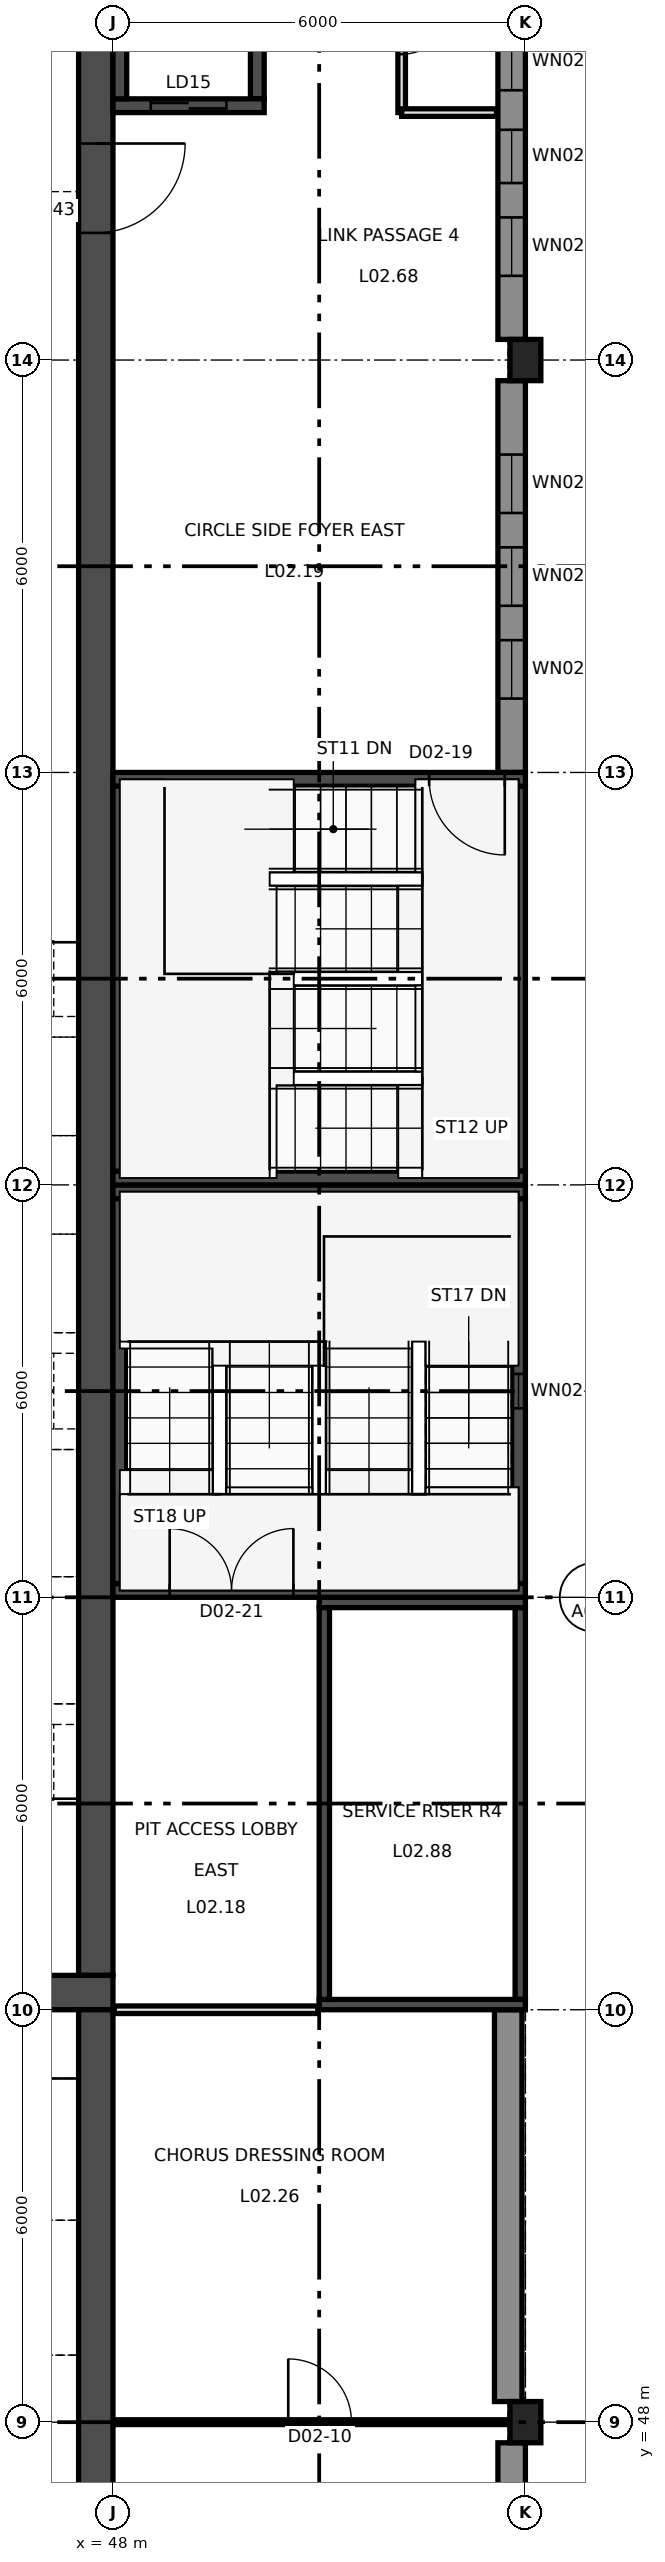
"""IFC4 building model, lengths in metres.
Left out: names, types, materials, properties, quantities, classifications, styles, units other than length and angle.
Written with IfcOpenShell. Run it as: python <this file> out.ifc"""

import sys

from ifc_helpers import new_model, si_unit, direction, frame, frame_2d, origin, origin_2d, place, context, subcontext, project, spatial, rectangle, extrude, element, fill, save


model = new_model("IFC4")
c1 = context("Model", 3, precision=1e-05, world=origin(), true_north=direction((0.0, 1.0)))
c2 = subcontext(c1, "Body", "Model", "MODEL_VIEW")
j1 = project(units=[si_unit("LENGTHUNIT", "METRE"), si_unit("PLANEANGLEUNIT", "RADIAN")], contexts=[c1])
p1 = place(None, origin())
s1 = spatial("IfcSite", under=j1, at=p1, CompositionType="ELEMENT")
p2 = place(p1, origin())
s2 = spatial("IfcBuilding", under=s1, at=p2, CompositionType="ELEMENT")
p3 = place(p2, frame((0.0, 0.0, 12.0)))
s3 = spatial("IfcBuildingStorey", under=s2, at=p3, CompositionType="ELEMENT", Elevation=12.0)
for number, where, z_axis, x_axis in (
    (1, (54.0, 48.0, 0.0), (0.0, 0.0, 1.0), (1.0, 0.0, 0.0)),
    (2, (54.0, 78.0, 0.0), (0.0, 0.0, 1.0), (1.0, 0.0, 0.0)),
):
    element("IfcColumn", number, at=place(p3, frame(where, z_axis=z_axis, x_axis=x_axis)), inside=s3, PredefinedType="COLUMN", context=c2, shape_type="SweptSolid", body=[
        extrude(rectangle(XDim=0.45, YDim=0.6, at=origin_2d()), origin(), (0.0, 0.0, 1.0), 4.5),
    ])
p4 = place(p3, frame((48.0, 71.9, 0.0), z_axis=(0.0, 0.0, 1.0), x_axis=(1.0, 0.0, 0.0)))
e3 = element("IfcWall", 3, at=p4, inside=s3, PredefinedType="SHEAR", context=c2, shape_type="SweptSolid", body=[
    extrude(rectangle(XDim=6.0, YDim=0.2, at=frame_2d((3.0, 0.0))), origin(), (0.0, 0.0, 1.0), 4.5),
])
p5 = place(p4, frame((4.6, 0.0, 0.0)))
e4 = element("IfcOpeningElement", 4, at=p5, cuts=e3, PredefinedType="OPENING", context=c2, shape_type="SweptSolid", body=[
    extrude(rectangle(XDim=1.1, YDim=2.2, at=frame_2d((0.55, 1.1))), frame((0.0, 0.11, 0.0), z_axis=(0.0, -1.0, 0.0), x_axis=(1.0, 0.0, 0.0)), (0.0, 0.0, 1.0), 0.22),
])
p6 = place(p3, frame((48.0, 66.1, 0.0), z_axis=(0.0, 0.0, 1.0), x_axis=(1.0, 0.0, 0.0)))
e5 = element("IfcWall", 5, at=p6, inside=s3, PredefinedType="SHEAR", context=c2, shape_type="SweptSolid", body=[
    extrude(rectangle(XDim=6.0, YDim=0.2, at=frame_2d((3.0, 0.0))), origin(), (0.0, 0.0, 1.0), 4.5),
])
for number, where, z_axis, x_axis in (
    (6, (48.1, 66.2, 0.0), (0.0, 0.0, 1.0), (0.0, 1.0, 0.0)),
    (7, (53.9, 66.2, 0.0), (0.0, 0.0, 1.0), (0.0, 1.0, 0.0)),
):
    element("IfcWall", number, at=place(p3, frame(where, z_axis=z_axis, x_axis=x_axis)), inside=s3, PredefinedType="SHEAR", context=c2, shape_type="SweptSolid", body=[
        extrude(rectangle(XDim=5.6, YDim=0.2, at=frame_2d((2.8, 0.0))), origin(), (0.0, 0.0, 1.0), 4.5),
    ])
p7 = place(p3, frame((48.0, 65.9, 0.0), z_axis=(0.0, 0.0, 1.0), x_axis=(1.0, 0.0, 0.0)))
e8 = element("IfcWall", 8, at=p7, inside=s3, PredefinedType="SHEAR", context=c2, shape_type="SweptSolid", body=[
    extrude(rectangle(XDim=6.0, YDim=0.2, at=frame_2d((3.0, 0.0))), origin(), (0.0, 0.0, 1.0), 4.5),
])
p8 = place(p3, frame((48.0, 60.1, 0.0), z_axis=(0.0, 0.0, 1.0), x_axis=(1.0, 0.0, 0.0)))
e9 = element("IfcWall", 9, at=p8, inside=s3, PredefinedType="SHEAR", context=c2, shape_type="SweptSolid", body=[
    extrude(rectangle(XDim=6.0, YDim=0.2, at=frame_2d((3.0, 0.0))), origin(), (0.0, 0.0, 1.0), 4.5),
])
p9 = place(p8, frame((0.825, 0.0, 0.0)))
e10 = element("IfcOpeningElement", 10, at=p9, cuts=e9, PredefinedType="OPENING", context=c2, shape_type="SweptSolid", body=[
    extrude(rectangle(XDim=1.8, YDim=2.2, at=frame_2d((0.9, 1.1))), frame((0.0, 0.11, 0.0), z_axis=(0.0, -1.0, 0.0), x_axis=(1.0, 0.0, 0.0)), (0.0, 0.0, 1.0), 0.22),
])
p10 = place(p3, frame((48.1, 60.2, 0.0), z_axis=(0.0, 0.0, 1.0), x_axis=(0.0, 1.0, 0.0)))
e11 = element("IfcWall", 11, at=p10, inside=s3, PredefinedType="SHEAR", context=c2, shape_type="SweptSolid", body=[
    extrude(rectangle(XDim=5.6, YDim=0.2, at=frame_2d((2.8, 0.0))), origin(), (0.0, 0.0, 1.0), 4.5),
])
p11 = place(p3, frame((53.9, 60.2, 0.0), z_axis=(0.0, 0.0, 1.0), x_axis=(0.0, 1.0, 0.0)))
e12 = element("IfcWall", 12, at=p11, inside=s3, PredefinedType="SHEAR", context=c2, shape_type="SweptSolid", body=[
    extrude(rectangle(XDim=5.6, YDim=0.2, at=frame_2d((2.8, 0.0))), origin(), (0.0, 0.0, 1.0), 4.5),
])
p12 = place(p11, frame((2.55, 0.0, 0.9)))
e13 = element("IfcOpeningElement", 13, at=p12, cuts=e12, PredefinedType="OPENING", context=c2, shape_type="SweptSolid", body=[
    extrude(rectangle(XDim=0.5, YDim=2.1, at=frame_2d((0.25, 1.05))), frame((0.0, 0.11, 0.0), z_axis=(0.0, -1.0, 0.0), x_axis=(1.0, 0.0, 0.0)), (0.0, 0.0, 1.0), 0.22),
])
p13 = place(p3, frame((48.0, 81.7, 0.0), z_axis=(0.0, 0.0, 1.0), x_axis=(1.0, 0.0, 0.0)))
e14 = element("IfcWall", 14, at=p13, inside=s3, PredefinedType="SHEAR", context=c2, shape_type="SweptSolid", body=[
    extrude(rectangle(XDim=2.2, YDim=0.2, at=frame_2d((1.1, 0.0))), origin(), (0.0, 0.0, 1.0), 4.5),
])
p14 = place(p13, frame((0.55, 0.0, 0.0)))
e15 = element("IfcOpeningElement", 15, at=p14, cuts=e14, PredefinedType="OPENING", context=c2, shape_type="SweptSolid", body=[
    extrude(rectangle(XDim=1.1, YDim=2.1, at=frame_2d((0.55, 1.05))), frame((0.0, 0.11, 0.0), z_axis=(0.0, -1.0, 0.0), x_axis=(1.0, 0.0, 0.0)), (0.0, 0.0, 1.0), 0.22),
])
for number, where, z_axis, x_axis in (
    (16, (48.1, 81.8, 0.0), (0.0, 0.0, 1.0), (0.0, 1.0, 0.0)),
    (17, (50.1, 81.8, 0.0), (0.0, 0.0, 1.0), (0.0, 1.0, 0.0)),
):
    element("IfcWall", number, at=place(p3, frame(where, z_axis=z_axis, x_axis=x_axis)), inside=s3, PredefinedType="SHEAR", context=c2, shape_type="SweptSolid", body=[
        extrude(rectangle(XDim=2.0, YDim=0.2, at=frame_2d((1.0, 0.0))), origin(), (0.0, 0.0, 1.0), 4.5),
    ])
for number, where, z_axis, x_axis in (
    (18, (51.0, 59.925, 0.0), (0.0, 0.0, 1.0), (1.0, 0.0, 0.0)),
    (19, (51.0, 54.075, 0.0), (0.0, 0.0, 1.0), (1.0, 0.0, 0.0)),
):
    element("IfcWall", number, at=place(p3, frame(where, z_axis=z_axis, x_axis=x_axis)), inside=s3, PredefinedType="SHEAR", context=c2, shape_type="SweptSolid", body=[
        extrude(rectangle(XDim=3.0, YDim=0.15, at=frame_2d((1.5, 0.0))), origin(), (0.0, 0.0, 1.0), 4.5),
    ])
for number, where, z_axis, x_axis in (
    (20, (51.075, 54.15, 0.0), (0.0, 0.0, 1.0), (0.0, 1.0, 0.0)),
    (21, (53.925, 54.15, 0.0), (0.0, 0.0, 1.0), (0.0, 1.0, 0.0)),
):
    element("IfcWall", number, at=place(p3, frame(where, z_axis=z_axis, x_axis=x_axis)), inside=s3, PredefinedType="SHEAR", context=c2, shape_type="SweptSolid", body=[
        extrude(rectangle(XDim=5.7, YDim=0.15, at=frame_2d((2.85, 0.0))), origin(), (0.0, 0.0, 1.0), 4.5),
    ])
p15 = place(p3, frame((47.75, 54.5, 0.0), z_axis=(0.0, 0.0, 1.0), x_axis=(0.0, 1.0, 0.0)))
e22 = element("IfcWall", 22, at=p15, inside=s3, PredefinedType="SHEAR", context=c2, shape_type="SweptSolid", body=[
    extrude(rectangle(XDim=35.5, YDim=0.5, at=frame_2d((17.75, 0.0))), origin(), (0.0, 0.0, 1.0), 4.5),
])
p16 = place(p15, frame((25.35, 0.0, 0.0)))
e23 = element("IfcOpeningElement", 23, at=p16, cuts=e22, PredefinedType="OPENING", context=c2, shape_type="SweptSolid", body=[
    extrude(rectangle(XDim=1.3, YDim=2.1, at=frame_2d((0.65, 1.05))), frame((0.0, 0.26, 0.0), z_axis=(0.0, -1.0, 0.0), x_axis=(1.0, 0.0, 0.0)), (0.0, 0.0, 1.0), 0.52),
])
p17 = place(p3, frame((47.75, 30.0, 0.0), z_axis=(0.0, 0.0, 1.0), x_axis=(0.0, 1.0, 0.0)))
e24 = element("IfcWall", 24, at=p17, inside=s3, PredefinedType="SHEAR", context=c2, shape_type="SweptSolid", body=[
    extrude(rectangle(XDim=24.0, YDim=0.5, at=frame_2d((12.0, 0.0))), origin(), (0.0, 0.0, 1.0), 4.5),
])
p18 = place(p3, frame((40.0, 54.25, 0.0), z_axis=(0.0, 0.0, 1.0), x_axis=(1.0, 0.0, 0.0)))
e25 = element("IfcWall", 25, at=p18, inside=s3, PredefinedType="SHEAR", context=c2, shape_type="SweptSolid", body=[
    extrude(rectangle(XDim=8.0, YDim=0.5, at=frame_2d((4.0, 0.0))), origin(), (0.0, 0.0, 1.0), 4.5),
])
p19 = place(p3, frame((53.8, 83.7, 0.0), z_axis=(0.0, 0.0, 1.0), x_axis=(0.0, -1.0, 0.0)))
e26 = element("IfcWall", 26, at=p19, inside=s3, PredefinedType="SOLIDWALL", context=c2, shape_type="SweptSolid", body=[
    extrude(rectangle(XDim=5.4, YDim=0.4, at=frame_2d((2.7, 0.0))), origin(), (0.0, 0.0, 1.0), 3.55),
])
p20 = place(p19, frame((0.925, 0.0, 0.9)))
e27 = element("IfcOpeningElement", 27, at=p20, cuts=e26, PredefinedType="OPENING", context=c2, shape_type="SweptSolid", body=[
    extrude(rectangle(XDim=0.85, YDim=2.45, at=frame_2d((0.425, 1.225))), frame((0.0, 0.21, 0.0), z_axis=(0.0, -1.0, 0.0), x_axis=(1.0, 0.0, 0.0)), (0.0, 0.0, 1.0), 0.42),
])
p21 = place(p19, frame((2.35, 0.0, 0.9)))
e28 = element("IfcOpeningElement", 28, at=p21, cuts=e26, PredefinedType="OPENING", context=c2, shape_type="SweptSolid", body=[
    extrude(rectangle(XDim=0.775, YDim=2.45, at=frame_2d((0.387, 1.225))), frame((0.0, 0.21, 0.0), z_axis=(0.0, -1.0, 0.0), x_axis=(1.0, 0.0, 0.0)), (0.0, 0.0, 1.0), 0.42),
])
p22 = place(p19, frame((3.625, 0.0, 0.9)))
e29 = element("IfcOpeningElement", 29, at=p22, cuts=e26, PredefinedType="OPENING", context=c2, shape_type="SweptSolid", body=[
    extrude(rectangle(XDim=0.85, YDim=2.45, at=frame_2d((0.425, 1.225))), frame((0.0, 0.21, 0.0), z_axis=(0.0, -1.0, 0.0), x_axis=(1.0, 0.0, 0.0)), (0.0, 0.0, 1.0), 0.42),
])
p23 = place(p3, frame((53.8, 77.7, 0.0), z_axis=(0.0, 0.0, 1.0), x_axis=(0.0, -1.0, 0.0)))
e30 = element("IfcWall", 30, at=p23, inside=s3, PredefinedType="SOLIDWALL", context=c2, shape_type="SweptSolid", body=[
    extrude(rectangle(XDim=5.7, YDim=0.4, at=frame_2d((2.85, 0.0))), origin(), (0.0, 0.0, 1.0), 3.55),
])
p24 = place(p23, frame((1.075, 0.0, 0.9)))
e31 = element("IfcOpeningElement", 31, at=p24, cuts=e30, PredefinedType="OPENING", context=c2, shape_type="SweptSolid", body=[
    extrude(rectangle(XDim=0.85, YDim=2.45, at=frame_2d((0.425, 1.225))), frame((0.0, 0.21, 0.0), z_axis=(0.0, -1.0, 0.0), x_axis=(1.0, 0.0, 0.0)), (0.0, 0.0, 1.0), 0.42),
])
p25 = place(p23, frame((2.425, 0.0, 0.9)))
e32 = element("IfcOpeningElement", 32, at=p25, cuts=e30, PredefinedType="OPENING", context=c2, shape_type="SweptSolid", body=[
    extrude(rectangle(XDim=0.85, YDim=2.45, at=frame_2d((0.425, 1.225))), frame((0.0, 0.21, 0.0), z_axis=(0.0, -1.0, 0.0), x_axis=(1.0, 0.0, 0.0)), (0.0, 0.0, 1.0), 0.42),
])
p26 = place(p23, frame((3.775, 0.0, 0.9)))
e33 = element("IfcOpeningElement", 33, at=p26, cuts=e30, PredefinedType="OPENING", context=c2, shape_type="SweptSolid", body=[
    extrude(rectangle(XDim=0.85, YDim=2.45, at=frame_2d((0.425, 1.225))), frame((0.0, 0.21, 0.0), z_axis=(0.0, -1.0, 0.0), x_axis=(1.0, 0.0, 0.0)), (0.0, 0.0, 1.0), 0.42),
])
p27 = place(p3, frame((53.75, 54.0, 0.0), z_axis=(0.0, 0.0, 1.0), x_axis=(0.0, -1.0, 0.0)))
e34 = element("IfcWall", 34, at=p27, inside=s3, PredefinedType="SOLIDWALL", context=c2, shape_type="SweptSolid", body=[
    extrude(rectangle(XDim=5.7, YDim=0.4, at=frame_2d((2.85, 0.0))), origin(), (0.0, 0.0, 1.0), 3.55),
])
p28 = place(p3, frame((53.8, 47.7, 0.0), z_axis=(0.0, 0.0, 1.0), x_axis=(0.0, -1.0, 0.0)))
e35 = element("IfcWall", 35, at=p28, inside=s3, PredefinedType="SOLIDWALL", context=c2, shape_type="SweptSolid", body=[
    extrude(rectangle(XDim=5.7, YDim=0.4, at=frame_2d((2.85, 0.0))), origin(), (0.0, 0.0, 1.0), 3.55),
])
p29 = place(p28, frame((1.075, 0.0, 0.9)))
e36 = element("IfcOpeningElement", 36, at=p29, cuts=e35, PredefinedType="OPENING", context=c2, shape_type="SweptSolid", body=[
    extrude(rectangle(XDim=0.85, YDim=2.45, at=frame_2d((0.425, 1.225))), frame((0.0, 0.21, 0.0), z_axis=(0.0, -1.0, 0.0), x_axis=(1.0, 0.0, 0.0)), (0.0, 0.0, 1.0), 0.42),
])
p30 = place(p28, frame((2.425, 0.0, 0.9)))
e37 = element("IfcOpeningElement", 37, at=p30, cuts=e35, PredefinedType="OPENING", context=c2, shape_type="SweptSolid", body=[
    extrude(rectangle(XDim=0.85, YDim=2.45, at=frame_2d((0.425, 1.225))), frame((0.0, 0.21, 0.0), z_axis=(0.0, -1.0, 0.0), x_axis=(1.0, 0.0, 0.0)), (0.0, 0.0, 1.0), 0.42),
])
p31 = place(p28, frame((3.775, 0.0, 0.9)))
e38 = element("IfcOpeningElement", 38, at=p31, cuts=e35, PredefinedType="OPENING", context=c2, shape_type="SweptSolid", body=[
    extrude(rectangle(XDim=0.85, YDim=2.45, at=frame_2d((0.425, 1.225))), frame((0.0, 0.21, 0.0), z_axis=(0.0, -1.0, 0.0), x_axis=(1.0, 0.0, 0.0)), (0.0, 0.0, 1.0), 0.42),
])
p32 = place(p3, frame((48.02, 54.0, 0.0), z_axis=(0.0, 0.0, 1.0), x_axis=(1.0, 0.0, 0.0)))
e39 = element("IfcWall", 39, at=p32, inside=s3, PredefinedType="PARTITIONING", context=c2, shape_type="SweptSolid", body=[
    extrude(rectangle(XDim=2.96, YDim=0.11, at=frame_2d((1.48, 0.0))), origin(), (0.0, 0.0, 1.0), 3.65),
])
p33 = place(p3, frame((52.2, 81.6, 0.0), z_axis=(0.0, 0.0, 1.0), x_axis=(0.0, 1.0, 0.0)))
e40 = element("IfcWall", 40, at=p33, inside=s3, PredefinedType="PARTITIONING", context=c2, shape_type="SweptSolid", body=[
    extrude(rectangle(XDim=2.4, YDim=0.11, at=frame_2d((1.2, 0.0))), origin(), (0.0, 0.0, 1.0), 3.65),
])
p34 = place(p33, frame((0.85, 0.0, 0.0)))
e41 = element("IfcOpeningElement", 41, at=p34, cuts=e40, PredefinedType="OPENING", context=c2, shape_type="SweptSolid", body=[
    extrude(rectangle(XDim=0.75, YDim=2.04, at=frame_2d((0.375, 1.02))), frame((0.0, 0.065, 0.0), z_axis=(0.0, -1.0, 0.0), x_axis=(1.0, 0.0, 0.0)), (0.0, 0.0, 1.0), 0.13),
])
p35 = place(p3, frame((52.2, 81.6, 0.0), z_axis=(0.0, 0.0, 1.0), x_axis=(1.0, 0.0, 0.0)))
e42 = element("IfcWall", 42, at=p35, inside=s3, PredefinedType="PARTITIONING", context=c2, shape_type="SweptSolid", body=[
    extrude(rectangle(XDim=1.38, YDim=0.11, at=frame_2d((0.69, 0.0))), origin(), (0.0, 0.0, 1.0), 4.25),
])
p36 = place(p3, frame((48.02, 48.0, 0.0), z_axis=(0.0, 0.0, 1.0), x_axis=(1.0, 0.0, 0.0)))
e43 = element("IfcWall", 43, at=p36, inside=s3, PredefinedType="PARTITIONING", context=c2, shape_type="SweptSolid", body=[
    extrude(rectangle(XDim=5.735, YDim=0.07, at=frame_2d((2.867, 0.0))), origin(), (0.0, 0.0, 1.0), 3.55),
])
p37 = place(p36, frame((2.53, 0.0, 0.0)))
e44 = element("IfcOpeningElement", 44, at=p37, cuts=e43, PredefinedType="OPENING", context=c2, shape_type="SweptSolid", body=[
    extrude(rectangle(XDim=0.92, YDim=2.04, at=frame_2d((0.46, 1.02))), frame((0.0, 0.045, 0.0), z_axis=(0.0, -1.0, 0.0), x_axis=(1.0, 0.0, 0.0)), (0.0, 0.0, 1.0), 0.09),
])
p38 = place(p20, origin())
e45 = element("IfcWindow", 45, at=p38, inside=s3, PartitioningType="SINGLE_PANEL", PredefinedType="WINDOW", context=c2, shape_type="SweptSolid", body=[
    extrude(rectangle(XDim=0.85, YDim=2.45, at=frame_2d((0.425, 1.225))), frame((0.0, 0.03, 0.0), z_axis=(0.0, -1.0, 0.0), x_axis=(1.0, 0.0, 0.0)), (0.0, 0.0, 1.0), 0.06),
])
fill(e27, e45)
p39 = place(p21, origin())
e46 = element("IfcWindow", 46, at=p39, inside=s3, PartitioningType="SINGLE_PANEL", PredefinedType="WINDOW", context=c2, shape_type="SweptSolid", body=[
    extrude(rectangle(XDim=0.775, YDim=2.45, at=frame_2d((0.387, 1.225))), frame((0.0, 0.03, 0.0), z_axis=(0.0, -1.0, 0.0), x_axis=(1.0, 0.0, 0.0)), (0.0, 0.0, 1.0), 0.06),
])
fill(e28, e46)
p40 = place(p22, origin())
e47 = element("IfcWindow", 47, at=p40, inside=s3, PartitioningType="SINGLE_PANEL", PredefinedType="WINDOW", context=c2, shape_type="SweptSolid", body=[
    extrude(rectangle(XDim=0.85, YDim=2.45, at=frame_2d((0.425, 1.225))), frame((0.0, 0.03, 0.0), z_axis=(0.0, -1.0, 0.0), x_axis=(1.0, 0.0, 0.0)), (0.0, 0.0, 1.0), 0.06),
])
fill(e29, e47)
p41 = place(p24, origin())
e48 = element("IfcWindow", 48, at=p41, inside=s3, PartitioningType="SINGLE_PANEL", PredefinedType="WINDOW", context=c2, shape_type="SweptSolid", body=[
    extrude(rectangle(XDim=0.85, YDim=2.45, at=frame_2d((0.425, 1.225))), frame((0.0, 0.03, 0.0), z_axis=(0.0, -1.0, 0.0), x_axis=(1.0, 0.0, 0.0)), (0.0, 0.0, 1.0), 0.06),
])
fill(e31, e48)
p42 = place(p25, origin())
e49 = element("IfcWindow", 49, at=p42, inside=s3, PartitioningType="SINGLE_PANEL", PredefinedType="WINDOW", context=c2, shape_type="SweptSolid", body=[
    extrude(rectangle(XDim=0.85, YDim=2.45, at=frame_2d((0.425, 1.225))), frame((0.0, 0.03, 0.0), z_axis=(0.0, -1.0, 0.0), x_axis=(1.0, 0.0, 0.0)), (0.0, 0.0, 1.0), 0.06),
])
fill(e32, e49)
p43 = place(p26, origin())
e50 = element("IfcWindow", 50, at=p43, inside=s3, PartitioningType="SINGLE_PANEL", PredefinedType="WINDOW", context=c2, shape_type="SweptSolid", body=[
    extrude(rectangle(XDim=0.85, YDim=2.45, at=frame_2d((0.425, 1.225))), frame((0.0, 0.03, 0.0), z_axis=(0.0, -1.0, 0.0), x_axis=(1.0, 0.0, 0.0)), (0.0, 0.0, 1.0), 0.06),
])
fill(e33, e50)
p44 = place(p12, origin())
e51 = element("IfcWindow", 51, at=p44, inside=s3, PartitioningType="SINGLE_PANEL", PredefinedType="WINDOW", context=c2, shape_type="SweptSolid", body=[
    extrude(rectangle(XDim=0.5, YDim=2.1, at=frame_2d((0.25, 1.05))), frame((0.0, 0.03, 0.0), z_axis=(0.0, -1.0, 0.0), x_axis=(1.0, 0.0, 0.0)), (0.0, 0.0, 1.0), 0.06),
])
fill(e13, e51)
p45 = place(p37, origin())
e52 = element("IfcDoor", 52, at=p45, inside=s3, OperationType="SINGLE_SWING_LEFT", PredefinedType="DOOR", context=c2, shape_type="SweptSolid", body=[
    extrude(rectangle(XDim=0.92, YDim=2.04, at=frame_2d((0.46, 1.02))), frame((0.0, 0.025, 0.0), z_axis=(0.0, -1.0, 0.0), x_axis=(1.0, 0.0, 0.0)), (0.0, 0.0, 1.0), 0.05),
])
fill(e44, e52)
p46 = place(p5, frame((1.1, 0.0, 0.0), z_axis=(0.0, 0.0, 1.0), x_axis=(-1.0, 0.0, 0.0)))
e53 = element("IfcDoor", 53, at=p46, inside=s3, OperationType="SINGLE_SWING_RIGHT", PredefinedType="DOOR", context=c2, shape_type="SweptSolid", body=[
    extrude(rectangle(XDim=1.1, YDim=2.2, at=frame_2d((0.55, 1.1))), frame((0.0, 0.025, 0.0), z_axis=(0.0, -1.0, 0.0), x_axis=(1.0, 0.0, 0.0)), (0.0, 0.0, 1.0), 0.05),
])
fill(e4, e53)
p47 = place(p9, origin())
e54 = element("IfcDoor", 54, at=p47, inside=s3, OperationType="DOUBLE_DOOR_SINGLE_SWING", PredefinedType="DOOR", context=c2, shape_type="SweptSolid", body=[
    extrude(rectangle(XDim=1.8, YDim=2.2, at=frame_2d((0.9, 1.1))), frame((0.0, 0.025, 0.0), z_axis=(0.0, -1.0, 0.0), x_axis=(1.0, 0.0, 0.0)), (0.0, 0.0, 1.0), 0.05),
])
fill(e10, e54)
p48 = place(p34, frame((0.75, 0.0, 0.0), z_axis=(0.0, 0.0, 1.0), x_axis=(-1.0, 0.0, 0.0)))
e55 = element("IfcDoor", 55, at=p48, inside=s3, OperationType="SINGLE_SWING_RIGHT", PredefinedType="DOOR", context=c2, shape_type="SweptSolid", body=[
    extrude(rectangle(XDim=0.75, YDim=2.04, at=frame_2d((0.375, 1.02))), frame((0.0, 0.025, 0.0), z_axis=(0.0, -1.0, 0.0), x_axis=(1.0, 0.0, 0.0)), (0.0, 0.0, 1.0), 0.05),
])
fill(e41, e55)
p49 = place(p16, frame((1.3, 0.0, 0.0), z_axis=(0.0, 0.0, 1.0), x_axis=(-1.0, 0.0, 0.0)))
e56 = element("IfcDoor", 56, at=p49, inside=s3, OperationType="SINGLE_SWING_RIGHT", PredefinedType="DOOR", context=c2, shape_type="SweptSolid", body=[
    extrude(rectangle(XDim=1.3, YDim=2.1, at=frame_2d((0.65, 1.05))), frame((0.0, 0.025, 0.0), z_axis=(0.0, -1.0, 0.0), x_axis=(1.0, 0.0, 0.0)), (0.0, 0.0, 1.0), 0.05),
])
fill(e23, e56)
p50 = place(p14, origin())
e57 = element("IfcDoor", 57, at=p50, inside=s3, OperationType="DOUBLE_DOOR_SLIDING", PredefinedType="DOOR", context=c2, shape_type="SweptSolid", body=[
    extrude(rectangle(XDim=1.1, YDim=2.1, at=frame_2d((0.55, 1.05))), frame((0.0, 0.025, 0.0), z_axis=(0.0, -1.0, 0.0), x_axis=(1.0, 0.0, 0.0)), (0.0, 0.0, 1.0), 0.05),
])
fill(e15, e57)
save(model, sys.argv[1])
